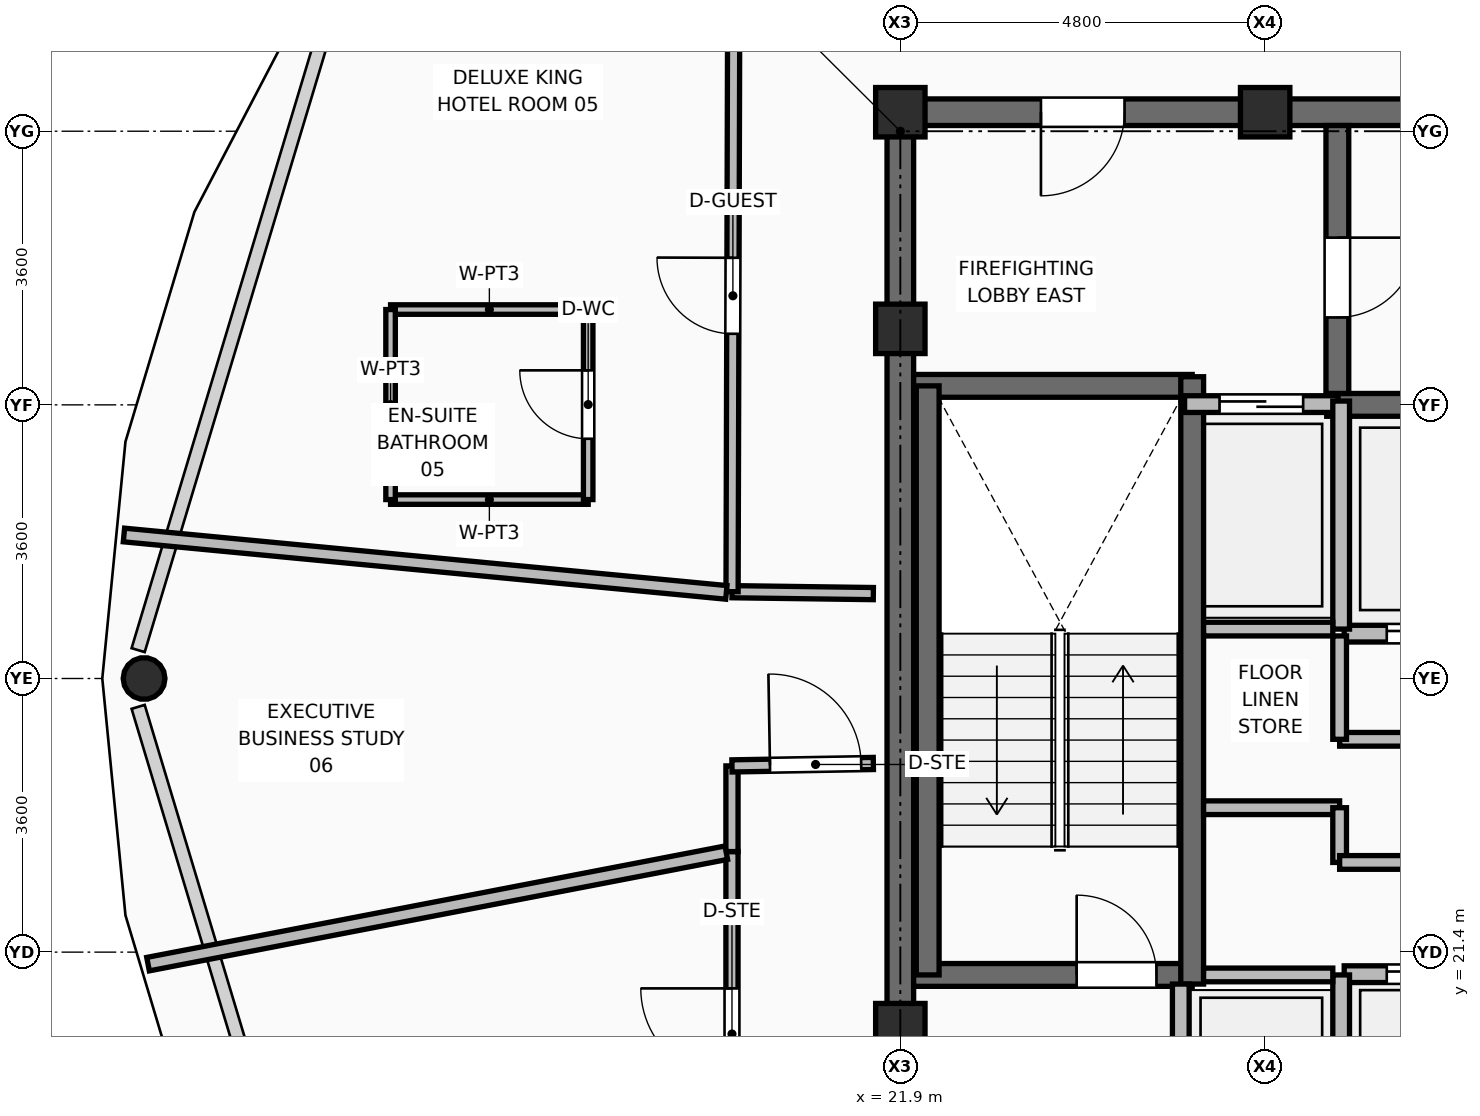
"""IFC4 building model, lengths in metres.
Left out: names, types, materials, properties, quantities, classifications, styles, units other than length and angle.
Written with IfcOpenShell. Run it as: python <this file> out.ifc"""

import sys

from ifc_helpers import new_model, si_unit, direction, frame, frame_2d, origin, origin_2d, place, context, subcontext, project, spatial, rectangle, hollow_circle, extrude, element, fill, save


model = new_model("IFC4")
c1 = context("Model", 3, precision=1e-05, world=origin(), true_north=direction((0.0, 1.0)))
c2 = subcontext(c1, "Body", "Model", "MODEL_VIEW")
j1 = project(units=[si_unit("LENGTHUNIT", "METRE"), si_unit("PLANEANGLEUNIT", "RADIAN")], contexts=[c1])
p1 = place(None, origin())
s1 = spatial("IfcSite", under=j1, at=p1, CompositionType="ELEMENT")
p2 = place(p1, origin())
s2 = spatial("IfcBuilding", under=s1, at=p2, CompositionType="ELEMENT")
p3 = place(p2, frame((0.0, 0.0, 278.85)))
s3 = spatial("IfcBuildingStorey", under=s2, at=p3, CompositionType="ELEMENT", Elevation=278.85)
for number, where, z_axis, x_axis in (
    (1, (21.9, 20.4, 0.0), (0.0, 0.0, 1.0), (1.0, 0.0, 0.0)),
    (2, (21.9, 29.6, 0.0), (0.0, 0.0, 1.0), (1.0, 0.0, 0.0)),
    (3, (21.9, 32.45, 0.0), (0.0, 0.0, 1.0), (1.0, 0.0, 0.0)),
    (4, (26.7, 32.45, 0.0), (0.0, 0.0, 1.0), (1.0, 0.0, 0.0)),
):
    element("IfcColumn", number, at=place(p3, frame(where, z_axis=z_axis, x_axis=x_axis)), inside=s3, PredefinedType="COLUMN", context=c2, shape_type="SweptSolid", body=[
        extrude(rectangle(XDim=0.65, YDim=0.65, at=origin_2d()), origin(), (0.0, 0.0, 1.0), 3.75),
    ])
p4 = place(p3, frame((14.569, 33.698, 0.0), z_axis=(0.185218066702, -0.09531807333, 0.978063767177), x_axis=(0.457587432232, 0.889164631474, 0.0)))
e5 = element("IfcColumn", 5, at=p4, inside=s3, PredefinedType="COLUMN", context=c2, shape_type="SweptSolid", body=[
    extrude(hollow_circle(Radius=0.275, WallThickness=0.025, at=origin_2d()), origin(), (0.0, 0.0, 1.0), 3.65),
])
p5 = place(p3, frame((11.95, 25.0, 0.0), z_axis=(0.213469718958, 0.0, 0.97694968094), x_axis=(0.0, 1.0, 0.0)))
e6 = element("IfcColumn", 6, at=p5, inside=s3, PredefinedType="COLUMN", context=c2, shape_type="SweptSolid", body=[
    extrude(hollow_circle(Radius=0.275, WallThickness=0.025, at=origin_2d()), origin(), (0.0, 0.0, 1.0), 3.654),
])
p6 = place(p3, frame((21.725, 32.45, 0.0), z_axis=(0.0, 0.0, 1.0), x_axis=(1.0, 0.0, 0.0)))
e7 = element("IfcWall", 7, at=p6, inside=s3, PredefinedType="SHEAR", context=c2, shape_type="SweptSolid", body=[
    extrude(rectangle(XDim=19.55, YDim=0.35, at=frame_2d((9.775, 0.0))), origin(), (0.0, 0.0, 1.0), 3.57),
])
p7 = place(p6, frame((2.025, 0.0, 0.0)))
e8 = element("IfcOpeningElement", 8, at=p7, cuts=e7, PredefinedType="OPENING", context=c2, shape_type="SweptSolid", body=[
    extrude(rectangle(XDim=1.1, YDim=2.1, at=frame_2d((0.55, 1.05))), frame((0.0, 0.185, 0.0), z_axis=(0.0, -1.0, 0.0), x_axis=(1.0, 0.0, 0.0)), (0.0, 0.0, 1.0), 0.37),
])
p8 = place(p6, frame((15.415, 0.0, 0.0)))
e9 = element("IfcOpeningElement", 9, at=p8, cuts=e7, PredefinedType="OPENING", context=c2, shape_type="SweptSolid", body=[
    extrude(rectangle(XDim=1.0, YDim=2.1, at=frame_2d((0.5, 1.05))), frame((0.0, 0.185, 0.0), z_axis=(0.0, -1.0, 0.0), x_axis=(1.0, 0.0, 0.0)), (0.0, 0.0, 1.0), 0.37),
])
p9 = place(p6, frame((17.425, 0.0, 0.0)))
e10 = element("IfcOpeningElement", 10, at=p9, cuts=e7, PredefinedType="OPENING", context=c2, shape_type="SweptSolid", body=[
    extrude(rectangle(XDim=0.9, YDim=2.1, at=frame_2d((0.45, 1.05))), frame((0.0, 0.185, 0.0), z_axis=(0.0, -1.0, 0.0), x_axis=(1.0, 0.0, 0.0)), (0.0, 0.0, 1.0), 0.37),
])
p10 = place(p3, frame((21.9, 17.975, 0.0), z_axis=(0.0, 0.0, 1.0), x_axis=(0.0, 1.0, 0.0)))
e11 = element("IfcWall", 11, at=p10, inside=s3, PredefinedType="SHEAR", context=c2, shape_type="SweptSolid", body=[
    extrude(rectangle(XDim=14.3, YDim=0.35, at=frame_2d((7.15, 0.0))), origin(), (0.0, 0.0, 1.0), 3.57),
])
p11 = place(p3, frame((22.075, 21.1, 0.0), z_axis=(0.0, 0.0, 1.0), x_axis=(1.0, 0.0, 0.0)))
e12 = element("IfcWall", 12, at=p11, inside=s3, PredefinedType="SHEAR", context=c2, shape_type="SweptSolid", body=[
    extrude(rectangle(XDim=3.665, YDim=0.3, at=frame_2d((1.833, 0.0))), origin(), (0.0, 0.0, 1.0), 3.57),
])
p12 = place(p11, frame((2.145, 0.0, 0.0)))
e13 = element("IfcOpeningElement", 13, at=p12, cuts=e12, PredefinedType="OPENING", context=c2, shape_type="SweptSolid", body=[
    extrude(rectangle(XDim=1.05, YDim=2.1, at=frame_2d((0.525, 1.05))), frame((0.0, 0.16, 0.0), z_axis=(0.0, -1.0, 0.0), x_axis=(1.0, 0.0, 0.0)), (0.0, 0.0, 1.0), 0.32),
])
p13 = place(p3, frame((22.075, 28.85, 0.0), z_axis=(0.0, 0.0, 1.0), x_axis=(1.0, 0.0, 0.0)))
e14 = element("IfcWall", 14, at=p13, inside=s3, PredefinedType="SHEAR", context=c2, shape_type="SweptSolid", body=[
    extrude(rectangle(XDim=3.665, YDim=0.3, at=frame_2d((1.833, 0.0))), origin(), (0.0, 0.0, 1.0), 3.57),
])
p14 = place(p3, frame((25.74, 20.98, 0.0), z_axis=(0.0, 0.0, 1.0), x_axis=(0.0, 1.0, 0.0)))
e15 = element("IfcWall", 15, at=p14, inside=s3, PredefinedType="SHEAR", context=c2, shape_type="SweptSolid", body=[
    extrude(rectangle(XDim=7.99, YDim=0.3, at=frame_2d((3.995, 0.0))), origin(), (0.0, 0.0, 1.0), 3.57),
])
p15 = place(p3, frame((22.26, 21.1, 0.0), z_axis=(0.0, 0.0, 1.0), x_axis=(0.0, 1.0, 0.0)))
e16 = element("IfcWall", 16, at=p15, inside=s3, PredefinedType="SHEAR", context=c2, shape_type="SweptSolid", body=[
    extrude(rectangle(XDim=7.75, YDim=0.3, at=frame_2d((3.875, 0.0))), origin(), (0.0, 0.0, 1.0), 3.57),
])
p16 = place(p3, frame((27.51, 28.6, 0.0), z_axis=(0.0, 0.0, 1.0), x_axis=(1.0, 0.0, 0.0)))
e17 = element("IfcWall", 17, at=p16, inside=s3, PredefinedType="SHEAR", context=c2, shape_type="SweptSolid", body=[
    extrude(rectangle(XDim=8.03, YDim=0.3, at=frame_2d((4.015, 0.0))), origin(), (0.0, 0.0, 1.0), 3.57),
])
p17 = place(p3, frame((27.65, 28.75, 0.0), z_axis=(0.0, 0.0, 1.0), x_axis=(0.0, 1.0, 0.0)))
e18 = element("IfcWall", 18, at=p17, inside=s3, PredefinedType="SHEAR", context=c2, shape_type="SweptSolid", body=[
    extrude(rectangle(XDim=3.525, YDim=0.3, at=frame_2d((1.762, 0.0))), origin(), (0.0, 0.0, 1.0), 3.57),
])
p18 = place(p17, frame((1.0, 0.0, 0.0)))
e19 = element("IfcOpeningElement", 19, at=p18, cuts=e18, PredefinedType="OPENING", context=c2, shape_type="SweptSolid", body=[
    extrude(rectangle(XDim=1.05, YDim=2.1, at=frame_2d((0.525, 1.05))), frame((0.0, 0.16, 0.0), z_axis=(0.0, -1.0, 0.0), x_axis=(1.0, 0.0, 0.0)), (0.0, 0.0, 1.0), 0.32),
])
p19 = place(p3, frame((25.59, 18.22, 0.0), z_axis=(0.0, 0.0, 1.0), x_axis=(0.0, 1.0, 0.0)))
e20 = element("IfcWall", 20, at=p19, inside=s3, PredefinedType="PARTITIONING", context=c2, shape_type="SweptSolid", body=[
    extrude(rectangle(XDim=2.76, YDim=0.22, at=frame_2d((1.38, 0.0))), origin(), (0.0, 0.0, 1.0), 3.55),
])
p20 = place(p19, frame((0.83, 0.0, 0.0)))
e21 = element("IfcOpeningElement", 21, at=p20, cuts=e20, PredefinedType="OPENING", context=c2, shape_type="SweptSolid", body=[
    extrude(rectangle(XDim=1.1, YDim=2.2, at=frame_2d((0.55, 1.1))), frame((0.0, 0.12, 0.0), z_axis=(0.0, -1.0, 0.0), x_axis=(1.0, 0.0, 0.0)), (0.0, 0.0, 1.0), 0.24),
])
p21 = place(p3, frame((25.64, 28.61, 0.0), z_axis=(0.0, 0.0, 1.0), x_axis=(1.0, 0.0, 0.0)))
e22 = element("IfcWall", 22, at=p21, inside=s3, PredefinedType="PARTITIONING", context=c2, shape_type="SweptSolid", body=[
    extrude(rectangle(XDim=2.02, YDim=0.22, at=frame_2d((1.01, 0.0))), origin(), (0.0, 0.0, 1.0), 3.55),
])
p22 = place(p21, frame((0.46, 0.0, 0.0)))
e23 = element("IfcOpeningElement", 23, at=p22, cuts=e22, PredefinedType="OPENING", context=c2, shape_type="SweptSolid", body=[
    extrude(rectangle(XDim=1.1, YDim=2.2, at=frame_2d((0.55, 1.1))), frame((0.0, 0.12, 0.0), z_axis=(0.0, -1.0, 0.0), x_axis=(1.0, 0.0, 0.0)), (0.0, 0.0, 1.0), 0.24),
])
p23 = place(p3, frame((27.74, 21.11, 0.0), z_axis=(0.0, 0.0, 1.0), x_axis=(1.0, 0.0, 0.0)))
e24 = element("IfcWall", 24, at=p23, inside=s3, PredefinedType="PARTITIONING", context=c2, shape_type="SweptSolid", body=[
    extrude(rectangle(XDim=2.22, YDim=0.22, at=frame_2d((1.11, 0.0))), origin(), (0.0, 0.0, 1.0), 3.55),
])
p24 = place(p23, frame((0.56, 0.0, 0.0)))
e25 = element("IfcOpeningElement", 25, at=p24, cuts=e24, PredefinedType="OPENING", context=c2, shape_type="SweptSolid", body=[
    extrude(rectangle(XDim=1.1, YDim=2.2, at=frame_2d((0.55, 1.1))), frame((0.0, 0.12, 0.0), z_axis=(0.0, -1.0, 0.0), x_axis=(1.0, 0.0, 0.0)), (0.0, 0.0, 1.0), 0.24),
])
p25 = place(p3, frame((27.74, 25.59, 0.0), z_axis=(0.0, 0.0, 1.0), x_axis=(1.0, 0.0, 0.0)))
e26 = element("IfcWall", 26, at=p25, inside=s3, PredefinedType="PARTITIONING", context=c2, shape_type="SweptSolid", body=[
    extrude(rectangle(XDim=2.22, YDim=0.22, at=frame_2d((1.11, 0.0))), origin(), (0.0, 0.0, 1.0), 3.55),
])
p26 = place(p25, frame((0.56, 0.0, 0.0)))
e27 = element("IfcOpeningElement", 27, at=p26, cuts=e26, PredefinedType="OPENING", context=c2, shape_type="SweptSolid", body=[
    extrude(rectangle(XDim=1.1, YDim=2.2, at=frame_2d((0.55, 1.1))), frame((0.0, 0.12, 0.0), z_axis=(0.0, -1.0, 0.0), x_axis=(1.0, 0.0, 0.0)), (0.0, 0.0, 1.0), 0.24),
])
p27 = place(p3, frame((27.7, 18.15, 0.0), z_axis=(0.0, 0.0, 1.0), x_axis=(0.0, 1.0, 0.0)))
e28 = element("IfcWall", 28, at=p27, inside=s3, PredefinedType="PARTITIONING", context=c2, shape_type="SweptSolid", body=[
    extrude(rectangle(XDim=2.95, YDim=0.22, at=frame_2d((1.475, 0.0))), origin(), (0.0, 0.0, 1.0), 3.55),
])
p28 = place(p3, frame((27.7, 25.65, 0.0), z_axis=(0.0, 0.0, 1.0), x_axis=(0.0, 1.0, 0.0)))
e29 = element("IfcWall", 29, at=p28, inside=s3, PredefinedType="PARTITIONING", context=c2, shape_type="SweptSolid", body=[
    extrude(rectangle(XDim=3.0, YDim=0.22, at=frame_2d((1.5, 0.0))), origin(), (0.0, 0.0, 1.0), 3.55),
])
for number, where, z_axis, x_axis in (
    (30, (25.89, 21.1, 0.0), (0.0, 0.0, 1.0), (1.0, 0.0, 0.0)),
    (31, (25.89, 25.65, 0.0), (0.0, 0.0, 1.0), (1.0, 0.0, 0.0)),
):
    element("IfcWall", number, at=place(p3, frame(where, z_axis=z_axis, x_axis=x_axis)), inside=s3, PredefinedType="PARTITIONING", context=c2, shape_type="SweptSolid", body=[
        extrude(rectangle(XDim=1.7, YDim=0.18, at=frame_2d((0.85, 0.0))), origin(), (0.0, 0.0, 1.0), 3.55),
    ])
p29 = place(p3, frame((25.89, 23.3, 0.0), z_axis=(0.0, 0.0, 1.0), x_axis=(1.0, 0.0, 0.0)))
e32 = element("IfcWall", 32, at=p29, inside=s3, PredefinedType="PARTITIONING", context=c2, shape_type="SweptSolid", body=[
    extrude(rectangle(XDim=1.79, YDim=0.18, at=frame_2d((0.895, 0.0))), origin(), (0.0, 0.0, 1.0), 3.55),
])
p30 = place(p3, frame((27.68, 22.58, 0.0), z_axis=(0.0, 0.0, 1.0), x_axis=(0.0, 1.0, 0.0)))
e33 = element("IfcWall", 33, at=p30, inside=s3, PredefinedType="PARTITIONING", context=c2, shape_type="SweptSolid", body=[
    extrude(rectangle(XDim=0.72, YDim=0.18, at=frame_2d((0.36, 0.0))), origin(), (0.0, 0.0, 1.0), 3.55),
])
for number, where, z_axis, x_axis in (
    (34, (27.68, 22.58, 0.0), (0.0, 0.0, 1.0), (1.0, 0.0, 0.0)),
    (35, (27.68, 24.2, 0.0), (0.0, 0.0, 1.0), (1.0, 0.0, 0.0)),
):
    element("IfcWall", number, at=place(p3, frame(where, z_axis=z_axis, x_axis=x_axis)), inside=s3, PredefinedType="PARTITIONING", context=c2, shape_type="SweptSolid", body=[
        extrude(rectangle(XDim=2.74, YDim=0.18, at=frame_2d((1.37, 0.0))), origin(), (0.0, 0.0, 1.0), 3.55),
    ])
p31 = place(p3, frame((27.68, 24.2, 0.0), z_axis=(0.0, 0.0, 1.0), x_axis=(0.0, 1.0, 0.0)))
e36 = element("IfcWall", 36, at=p31, inside=s3, PredefinedType="PARTITIONING", context=c2, shape_type="SweptSolid", body=[
    extrude(rectangle(XDim=1.36, YDim=0.18, at=frame_2d((0.68, 0.0))), origin(), (0.0, 0.0, 1.0), 3.55),
])
p32 = place(p3, frame((21.545, 26.117, 0.0), z_axis=(0.0, 0.0, 1.0), x_axis=(-0.999908513059, 0.0135264745, 0.0)))
e37 = element("IfcWall", 37, at=p32, inside=s3, PredefinedType="PARTITIONING", context=c2, shape_type="SweptSolid", body=[
    extrude(rectangle(XDim=1.859, YDim=0.16, at=frame_2d((0.93, 0.0))), origin(), (0.0, 0.0, 1.0), 2.595),
])
p33 = place(p3, frame((19.686, 26.142, 0.0), z_axis=(0.0, 0.0, 1.0), x_axis=(0.002808172778, 0.999996057075, 0.0)))
e38 = element("IfcWall", 38, at=p33, inside=s3, PredefinedType="PARTITIONING", context=c2, shape_type="SweptSolid", body=[
    extrude(rectangle(XDim=8.52, YDim=0.16, at=frame_2d((4.26, 0.0))), origin(), (0.0, 0.0, 1.0), 3.132),
])
p34 = place(p33, frame((3.393, 0.0, 0.0)))
e39 = element("IfcOpeningElement", 39, at=p34, cuts=e38, PredefinedType="OPENING", context=c2, shape_type="SweptSolid", body=[
    extrude(rectangle(XDim=1.0, YDim=2.1, at=frame_2d((0.5, 1.05))), frame((0.0, 0.09, 0.0), z_axis=(0.0, -1.0, 0.0), x_axis=(1.0, 0.0, 0.0)), (0.0, 0.0, 1.0), 0.18),
])
p35 = place(p3, frame((19.685, 17.774, 0.0), z_axis=(0.0, 0.0, 1.0), x_axis=(0.0, 1.0, 0.0)))
e40 = element("IfcWall", 40, at=p35, inside=s3, PredefinedType="PARTITIONING", context=c2, shape_type="SweptSolid", body=[
    extrude(rectangle(XDim=4.949, YDim=0.16, at=frame_2d((2.475, 0.0))), origin(), (0.0, 0.0, 1.0), 3.132),
])
p36 = place(p35, frame((1.949, 0.0, 0.0)))
e41 = element("IfcOpeningElement", 41, at=p36, cuts=e40, PredefinedType="OPENING", context=c2, shape_type="SweptSolid", body=[
    extrude(rectangle(XDim=1.2, YDim=2.1, at=frame_2d((0.6, 1.05))), frame((0.0, 0.09, 0.0), z_axis=(0.0, -1.0, 0.0), x_axis=(1.0, 0.0, 0.0)), (0.0, 0.0, 1.0), 0.18),
])
p37 = place(p3, frame((19.685, 22.723, 0.0), z_axis=(0.0, 0.0, 1.0), x_axis=(0.0, 1.0, 0.0)))
e42 = element("IfcWall", 42, at=p37, inside=s3, PredefinedType="PARTITIONING", context=c2, shape_type="SweptSolid", body=[
    extrude(rectangle(XDim=1.127, YDim=0.16, at=frame_2d((0.563, 0.0))), origin(), (0.0, 0.0, 1.0), 3.55),
])
p38 = place(p3, frame((19.685, 23.85, 0.0), z_axis=(0.0, 0.0, 1.0), x_axis=(0.999852179606, 0.017193572529, 0.0)))
e43 = element("IfcWall", 43, at=p38, inside=s3, PredefinedType="PARTITIONING", context=c2, shape_type="SweptSolid", body=[
    extrude(rectangle(XDim=1.86, YDim=0.16, at=frame_2d((0.93, 0.0))), origin(), (0.0, 0.0, 1.0), 2.595),
])
p39 = place(p38, frame((0.5, 0.0, 0.0)))
e44 = element("IfcOpeningElement", 44, at=p39, cuts=e43, PredefinedType="OPENING", context=c2, shape_type="SweptSolid", body=[
    extrude(rectangle(XDim=1.2, YDim=2.1, at=frame_2d((0.6, 1.05))), frame((0.0, 0.09, 0.0), z_axis=(0.0, -1.0, 0.0), x_axis=(1.0, 0.0, 0.0)), (0.0, 0.0, 1.0), 0.18),
])
p40 = place(p3, frame((19.611, 26.133, 0.0), z_axis=(0.0, 0.0, 1.0), x_axis=(-0.995495196961, 0.094811986724, 0.0)))
e45 = element("IfcWall", 45, at=p40, inside=s3, PredefinedType="PARTITIONING", context=c2, shape_type="SweptSolid", body=[
    extrude(rectangle(XDim=7.962, YDim=0.18, at=frame_2d((3.981, 0.0))), origin(), (0.0, 0.0, 1.0), 3.003),
])
p41 = place(p3, frame((19.61, 22.708, 0.0), z_axis=(0.0, 0.0, 1.0), x_axis=(-0.981935582375, -0.18921551751, 0.0)))
e46 = element("IfcWall", 46, at=p41, inside=s3, PredefinedType="PARTITIONING", context=c2, shape_type="SweptSolid", body=[
    extrude(rectangle(XDim=7.748, YDim=0.18, at=frame_2d((3.874, 0.0))), origin(), (0.0, 0.0, 1.0), 3.003),
])
for number, where, z_axis, x_axis in (
    (47, (15.193, 27.354, 0.0), (0.0, 0.0, 1.0), (1.0, 0.0, 0.0)),
    (48, (15.193, 29.854, 0.0), (0.0, 0.0, 1.0), (1.0, 0.0, 0.0)),
):
    element("IfcWall", number, at=place(p3, frame(where, z_axis=z_axis, x_axis=x_axis)), inside=s3, PredefinedType="PARTITIONING", context=c2, shape_type="SweptSolid", body=[
        extrude(rectangle(XDim=2.6, YDim=0.125, at=frame_2d((1.3, 0.0))), origin(), (0.0, 0.0, 1.0), 3.55),
    ])
p42 = place(p3, frame((15.193, 27.354, 0.0), z_axis=(0.0, 0.0, 1.0), x_axis=(0.0, 1.0, 0.0)))
e49 = element("IfcWall", 49, at=p42, inside=s3, PredefinedType="PARTITIONING", context=c2, shape_type="SweptSolid", body=[
    extrude(rectangle(XDim=2.5, YDim=0.125, at=frame_2d((1.25, 0.0))), origin(), (0.0, 0.0, 1.0), 3.55),
])
p43 = place(p3, frame((17.793, 27.354, 0.0), z_axis=(0.0, 0.0, 1.0), x_axis=(0.0, 1.0, 0.0)))
e50 = element("IfcWall", 50, at=p43, inside=s3, PredefinedType="PARTITIONING", context=c2, shape_type="SweptSolid", body=[
    extrude(rectangle(XDim=2.5, YDim=0.125, at=frame_2d((1.25, 0.0))), origin(), (0.0, 0.0, 1.0), 3.55),
])
p44 = place(p43, frame((0.8, 0.0, 0.0)))
e51 = element("IfcOpeningElement", 51, at=p44, cuts=e50, PredefinedType="OPENING", context=c2, shape_type="SweptSolid", body=[
    extrude(rectangle(XDim=0.9, YDim=2.1, at=frame_2d((0.45, 1.05))), frame((0.0, 0.073, 0.0), z_axis=(0.0, -1.0, 0.0), x_axis=(1.0, 0.0, 0.0)), (0.0, 0.0, 1.0), 0.145),
])
p45 = place(p12, origin())
e52 = element("IfcDoor", 52, at=p45, inside=s3, OperationType="SINGLE_SWING_LEFT", PredefinedType="DOOR", context=c2, shape_type="SweptSolid", body=[
    extrude(rectangle(XDim=1.05, YDim=2.1, at=frame_2d((0.525, 1.05))), frame((0.0, 0.025, 0.0), z_axis=(0.0, -1.0, 0.0), x_axis=(1.0, 0.0, 0.0)), (0.0, 0.0, 1.0), 0.05),
])
fill(e13, e52)
p46 = place(p18, frame((1.05, 0.0, 0.0), z_axis=(0.0, 0.0, 1.0), x_axis=(-1.0, 0.0, 0.0)))
e53 = element("IfcDoor", 53, at=p46, inside=s3, OperationType="SINGLE_SWING_LEFT", PredefinedType="DOOR", context=c2, shape_type="SweptSolid", body=[
    extrude(rectangle(XDim=1.05, YDim=2.1, at=frame_2d((0.525, 1.05))), frame((0.0, 0.025, 0.0), z_axis=(0.0, -1.0, 0.0), x_axis=(1.0, 0.0, 0.0)), (0.0, 0.0, 1.0), 0.05),
])
fill(e19, e53)
p47 = place(p22, origin())
e54 = element("IfcDoor", 54, at=p47, inside=s3, OperationType="DOUBLE_DOOR_SLIDING", PredefinedType="DOOR", context=c2, shape_type="SweptSolid", body=[
    extrude(rectangle(XDim=1.1, YDim=2.2, at=frame_2d((0.55, 1.1))), frame((0.0, 0.025, 0.0), z_axis=(0.0, -1.0, 0.0), x_axis=(1.0, 0.0, 0.0)), (0.0, 0.0, 1.0), 0.05),
])
fill(e23, e54)
p48 = place(p24, origin())
e55 = element("IfcDoor", 55, at=p48, inside=s3, OperationType="DOUBLE_DOOR_SLIDING", PredefinedType="DOOR", context=c2, shape_type="SweptSolid", body=[
    extrude(rectangle(XDim=1.1, YDim=2.2, at=frame_2d((0.55, 1.1))), frame((0.0, 0.025, 0.0), z_axis=(0.0, -1.0, 0.0), x_axis=(1.0, 0.0, 0.0)), (0.0, 0.0, 1.0), 0.05),
])
fill(e25, e55)
p49 = place(p26, frame((1.1, 0.0, 0.0), z_axis=(0.0, 0.0, 1.0), x_axis=(-1.0, 0.0, 0.0)))
e56 = element("IfcDoor", 56, at=p49, inside=s3, OperationType="DOUBLE_DOOR_SLIDING", PredefinedType="DOOR", context=c2, shape_type="SweptSolid", body=[
    extrude(rectangle(XDim=1.1, YDim=2.2, at=frame_2d((0.55, 1.1))), frame((0.0, 0.025, 0.0), z_axis=(0.0, -1.0, 0.0), x_axis=(1.0, 0.0, 0.0)), (0.0, 0.0, 1.0), 0.05),
])
fill(e27, e56)
p50 = place(p7, frame((1.1, 0.0, 0.0), z_axis=(0.0, 0.0, 1.0), x_axis=(-1.0, 0.0, 0.0)))
e57 = element("IfcDoor", 57, at=p50, inside=s3, OperationType="SINGLE_SWING_RIGHT", PredefinedType="DOOR", context=c2, shape_type="SweptSolid", body=[
    extrude(rectangle(XDim=1.1, YDim=2.1, at=frame_2d((0.55, 1.05))), frame((0.0, 0.025, 0.0), z_axis=(0.0, -1.0, 0.0), x_axis=(1.0, 0.0, 0.0)), (0.0, 0.0, 1.0), 0.05),
])
fill(e8, e57)
p51 = place(p44, origin())
e58 = element("IfcDoor", 58, at=p51, inside=s3, OperationType="SINGLE_SWING_RIGHT", PredefinedType="DOOR", context=c2, shape_type="SweptSolid", body=[
    extrude(rectangle(XDim=0.9, YDim=2.1, at=frame_2d((0.45, 1.05))), frame((0.0, 0.025, 0.0), z_axis=(0.0, -1.0, 0.0), x_axis=(1.0, 0.0, 0.0)), (0.0, 0.0, 1.0), 0.05),
])
fill(e51, e58)
p52 = place(p34, origin())
e59 = element("IfcDoor", 59, at=p52, inside=s3, OperationType="SINGLE_SWING_RIGHT", PredefinedType="DOOR", context=c2, shape_type="SweptSolid", body=[
    extrude(rectangle(XDim=1.0, YDim=2.1, at=frame_2d((0.5, 1.05))), frame((0.0, 0.025, 0.0), z_axis=(0.0, -1.0, 0.0), x_axis=(1.0, 0.0, 0.0)), (0.0, 0.0, 1.0), 0.05),
])
fill(e39, e59)
p53 = place(p39, origin())
e60 = element("IfcDoor", 60, at=p53, inside=s3, OperationType="SINGLE_SWING_LEFT", PredefinedType="DOOR", context=c2, shape_type="SweptSolid", body=[
    extrude(rectangle(XDim=1.2, YDim=2.1, at=frame_2d((0.6, 1.05))), frame((0.0, 0.025, 0.0), z_axis=(0.0, -1.0, 0.0), x_axis=(1.0, 0.0, 0.0)), (0.0, 0.0, 1.0), 0.05),
])
fill(e44, e60)
p54 = place(p36, origin())
e61 = element("IfcDoor", 61, at=p54, inside=s3, OperationType="SINGLE_SWING_RIGHT", PredefinedType="DOOR", context=c2, shape_type="SweptSolid", body=[
    extrude(rectangle(XDim=1.2, YDim=2.1, at=frame_2d((0.6, 1.05))), frame((0.0, 0.025, 0.0), z_axis=(0.0, -1.0, 0.0), x_axis=(1.0, 0.0, 0.0)), (0.0, 0.0, 1.0), 0.05),
])
fill(e41, e61)
save(model, sys.argv[1])
